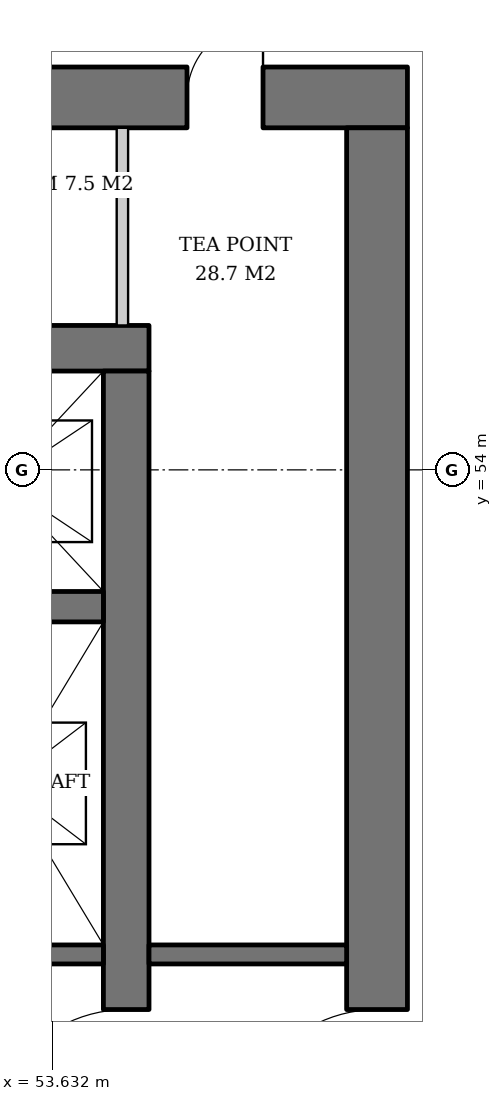
"""IFC4 building model, lengths in metres.
Left out: names, types, materials, properties, quantities, classifications, styles, units other than length and angle.
Written with IfcOpenShell. Run it as: python <this file> out.ifc"""

import sys

from ifc_helpers import new_model, si_unit, direction, frame, frame_2d, origin, place, context, subcontext, project, spatial, rectangle, extrude, element, fill, save


model = new_model("IFC4")
c1 = context("Model", 3, precision=1e-05, world=origin(), true_north=direction((0.0, 1.0)))
c2 = subcontext(c1, "Body", "Model", "MODEL_VIEW")
j1 = project(units=[si_unit("LENGTHUNIT", "METRE"), si_unit("PLANEANGLEUNIT", "RADIAN")], contexts=[c1])
p1 = place(None, origin())
s1 = spatial("IfcSite", under=j1, at=p1, CompositionType="ELEMENT")
p2 = place(p1, origin())
s2 = spatial("IfcBuilding", under=s1, at=p2, CompositionType="ELEMENT")
p3 = place(p2, frame((0.0, 0.0, 66.6)))
s3 = spatial("IfcBuildingStorey", under=s2, at=p3, CompositionType="ELEMENT", Elevation=66.6)
p4 = place(p3, frame((35.1, 55.6, 0.0), z_axis=(0.0, 0.0, 1.0), x_axis=(1.0, 0.0, 0.0)))
e1 = element("IfcWall", 1, at=p4, inside=s3, PredefinedType="SHEAR", context=c2, shape_type="SweptSolid", body=[
    extrude(rectangle(XDim=19.8, YDim=0.6, at=frame_2d((9.9, 0.0))), origin(), (0.0, 0.0, 1.0), 3.8),
])
p5 = place(p4, frame((14.54, 0.0, 0.0)))
e2 = element("IfcOpeningElement", 2, at=p5, cuts=e1, PredefinedType="OPENING", context=c2, shape_type="SweptSolid", body=[
    extrude(rectangle(XDim=1.0, YDim=2.1, at=frame_2d((0.5, 1.05))), frame((0.0, 0.31, 0.0), z_axis=(0.0, -1.0, 0.0), x_axis=(1.0, 0.0, 0.0)), (0.0, 0.0, 1.0), 0.62),
])
p6 = place(p4, frame((2.425, 0.0, 0.0)))
e3 = element("IfcOpeningElement", 3, at=p6, cuts=e1, PredefinedType="OPENING", context=c2, shape_type="SweptSolid", body=[
    extrude(rectangle(XDim=1.0, YDim=2.1, at=frame_2d((0.5, 1.05))), frame((0.0, 0.31, 0.0), z_axis=(0.0, -1.0, 0.0), x_axis=(1.0, 0.0, 0.0)), (0.0, 0.0, 1.0), 0.62),
])
p7 = place(p3, frame((54.6, 36.7, 0.0), z_axis=(0.0, 0.0, 1.0), x_axis=(0.0, 1.0, 0.0)))
e4 = element("IfcWall", 4, at=p7, inside=s3, PredefinedType="SHEAR", context=c2, shape_type="SweptSolid", body=[
    extrude(rectangle(XDim=18.6, YDim=0.6, at=frame_2d((9.3, 0.0))), origin(), (0.0, 0.0, 1.0), 3.8),
])
p8 = place(p7, frame((8.4, 0.0, 0.0)))
e5 = element("IfcOpeningElement", 5, at=p8, cuts=e4, PredefinedType="OPENING", context=c2, shape_type="SweptSolid", body=[
    extrude(rectangle(XDim=1.8, YDim=2.4, at=frame_2d((0.9, 1.2))), frame((0.0, 0.31, 0.0), z_axis=(0.0, -1.0, 0.0), x_axis=(1.0, 0.0, 0.0)), (0.0, 0.0, 1.0), 0.62),
])
p9 = place(p3, frame((31.7, 58.9, 0.0), z_axis=(0.0, 0.0, 1.0), x_axis=(1.0, 0.0, 0.0)))
e6 = element("IfcWall", 6, at=p9, inside=s3, PredefinedType="SHEAR", context=c2, shape_type="SweptSolid", body=[
    extrude(rectangle(XDim=26.6, YDim=0.8, at=frame_2d((13.3, 0.0))), origin(), (0.0, 0.0, 1.0), 3.8),
])
p10 = place(p9, frame((17.94, 0.0, 0.0)))
e7 = element("IfcOpeningElement", 7, at=p10, cuts=e6, PredefinedType="OPENING", context=c2, shape_type="SweptSolid", body=[
    extrude(rectangle(XDim=1.0, YDim=2.1, at=frame_2d((0.5, 1.05))), frame((0.0, 0.41, 0.0), z_axis=(0.0, -1.0, 0.0), x_axis=(1.0, 0.0, 0.0)), (0.0, 0.0, 1.0), 0.82),
])
p11 = place(p9, frame((5.825, 0.0, 0.0)))
e8 = element("IfcOpeningElement", 8, at=p11, cuts=e6, PredefinedType="OPENING", context=c2, shape_type="SweptSolid", body=[
    extrude(rectangle(XDim=1.0, YDim=2.1, at=frame_2d((0.5, 1.05))), frame((0.0, 0.41, 0.0), z_axis=(0.0, -1.0, 0.0), x_axis=(1.0, 0.0, 0.0)), (0.0, 0.0, 1.0), 0.82),
])
p12 = place(p9, frame((1.233, 0.0, 0.0)))
e9 = element("IfcOpeningElement", 9, at=p12, cuts=e6, PredefinedType="OPENING", context=c2, shape_type="SweptSolid", body=[
    extrude(rectangle(XDim=1.0, YDim=2.1, at=frame_2d((0.5, 1.05))), frame((0.0, 0.41, 0.0), z_axis=(0.0, -1.0, 0.0), x_axis=(1.0, 0.0, 0.0)), (0.0, 0.0, 1.0), 0.82),
])
p13 = place(p9, frame((3.479, 0.0, 0.0)))
e10 = element("IfcOpeningElement", 10, at=p13, cuts=e6, PredefinedType="OPENING", context=c2, shape_type="SweptSolid", body=[
    extrude(rectangle(XDim=1.0, YDim=2.1, at=frame_2d((0.5, 1.05))), frame((0.0, 0.41, 0.0), z_axis=(0.0, -1.0, 0.0), x_axis=(1.0, 0.0, 0.0)), (0.0, 0.0, 1.0), 0.82),
])
p14 = place(p9, frame((7.95, 0.0, 0.0)))
e11 = element("IfcOpeningElement", 11, at=p14, cuts=e6, PredefinedType="OPENING", context=c2, shape_type="SweptSolid", body=[
    extrude(rectangle(XDim=1.0, YDim=2.1, at=frame_2d((0.5, 1.05))), frame((0.0, 0.41, 0.0), z_axis=(0.0, -1.0, 0.0), x_axis=(1.0, 0.0, 0.0)), (0.0, 0.0, 1.0), 0.82),
])
p15 = place(p9, frame((11.038, 0.0, 0.0)))
e12 = element("IfcOpeningElement", 12, at=p15, cuts=e6, PredefinedType="OPENING", context=c2, shape_type="SweptSolid", body=[
    extrude(rectangle(XDim=1.0, YDim=2.1, at=frame_2d((0.5, 1.05))), frame((0.0, 0.41, 0.0), z_axis=(0.0, -1.0, 0.0), x_axis=(1.0, 0.0, 0.0)), (0.0, 0.0, 1.0), 0.82),
])
p16 = place(p9, frame((14.666, 0.0, 0.0)))
e13 = element("IfcOpeningElement", 13, at=p16, cuts=e6, PredefinedType="OPENING", context=c2, shape_type="SweptSolid", body=[
    extrude(rectangle(XDim=1.0, YDim=2.1, at=frame_2d((0.5, 1.05))), frame((0.0, 0.41, 0.0), z_axis=(0.0, -1.0, 0.0), x_axis=(1.0, 0.0, 0.0)), (0.0, 0.0, 1.0), 0.82),
])
p17 = place(p9, frame((20.875, 0.0, 0.0)))
e14 = element("IfcOpeningElement", 14, at=p17, cuts=e6, PredefinedType="OPENING", context=c2, shape_type="SweptSolid", body=[
    extrude(rectangle(XDim=1.0, YDim=2.1, at=frame_2d((0.5, 1.05))), frame((0.0, 0.41, 0.0), z_axis=(0.0, -1.0, 0.0), x_axis=(1.0, 0.0, 0.0)), (0.0, 0.0, 1.0), 0.82),
])
p18 = place(p9, frame((23.7, 0.0, 0.0)))
e15 = element("IfcOpeningElement", 15, at=p18, cuts=e6, PredefinedType="OPENING", context=c2, shape_type="SweptSolid", body=[
    extrude(rectangle(XDim=1.0, YDim=2.1, at=frame_2d((0.5, 1.05))), frame((0.0, 0.41, 0.0), z_axis=(0.0, -1.0, 0.0), x_axis=(1.0, 0.0, 0.0)), (0.0, 0.0, 1.0), 0.82),
])
p19 = place(p3, frame((57.9, 33.5, 0.0), z_axis=(0.0, 0.0, 1.0), x_axis=(0.0, 1.0, 0.0)))
e16 = element("IfcWall", 16, at=p19, inside=s3, PredefinedType="SHEAR", context=c2, shape_type="SweptSolid", body=[
    extrude(rectangle(XDim=25.0, YDim=0.8, at=frame_2d((12.5, 0.0))), origin(), (0.0, 0.0, 1.0), 3.8),
])
p20 = place(p19, frame((11.6, 0.0, 0.0)))
e17 = element("IfcOpeningElement", 17, at=p20, cuts=e16, PredefinedType="OPENING", context=c2, shape_type="SweptSolid", body=[
    extrude(rectangle(XDim=1.8, YDim=2.4, at=frame_2d((0.9, 1.2))), frame((0.0, 0.41, 0.0), z_axis=(0.0, -1.0, 0.0), x_axis=(1.0, 0.0, 0.0)), (0.0, 0.0, 1.0), 0.82),
])
p21 = place(p3, frame((35.7, 52.2, 0.0), z_axis=(0.0, 0.0, 1.0), x_axis=(1.0, 0.0, 0.0)))
e18 = element("IfcWall", 18, at=p21, inside=s3, PredefinedType="SHEAR", context=c2, shape_type="SweptSolid", body=[
    extrude(rectangle(XDim=18.6, YDim=0.4, at=frame_2d((9.3, 0.0))), origin(), (0.0, 0.0, 1.0), 3.8),
])
p22 = place(p3, frame((48.93, 47.625, 0.0), z_axis=(0.0, 0.0, 1.0), x_axis=(1.0, 0.0, 0.0)))
e19 = element("IfcWall", 19, at=p22, inside=s3, PredefinedType="SHEAR", context=c2, shape_type="SweptSolid", body=[
    extrude(rectangle(XDim=5.37, YDim=0.25, at=frame_2d((2.685, 0.0))), origin(), (0.0, 0.0, 1.0), 3.8),
])
p23 = place(p3, frame((54.9, 47.625, 0.0), z_axis=(0.0, 0.0, 1.0), x_axis=(1.0, 0.0, 0.0)))
e20 = element("IfcWall", 20, at=p23, inside=s3, PredefinedType="SOLIDWALL", context=c2, shape_type="SweptSolid", body=[
    extrude(rectangle(XDim=2.6, YDim=0.25, at=frame_2d((1.3, 0.0))), origin(), (0.0, 0.0, 1.0), 3.62),
])
p24 = place(p3, frame((54.55, 55.9, 0.0), z_axis=(0.0, 0.0, 1.0), x_axis=(0.0, 1.0, 0.0)))
e21 = element("IfcWall", 21, at=p24, inside=s3, PredefinedType="SOLIDWALL", context=c2, shape_type="SweptSolid", body=[
    extrude(rectangle(XDim=2.6, YDim=0.15, at=frame_2d((1.3, 0.0))), origin(), (0.0, 0.0, 1.0), 3.62),
])
p25 = place(p8, origin())
e22 = element("IfcDoor", 22, at=p25, inside=s3, OperationType="DOUBLE_DOOR_SINGLE_SWING", PredefinedType="DOOR", context=c2, shape_type="SweptSolid", body=[
    extrude(rectangle(XDim=1.8, YDim=2.4, at=frame_2d((0.9, 1.2))), frame((0.0, 0.025, 0.0), z_axis=(0.0, -1.0, 0.0), x_axis=(1.0, 0.0, 0.0)), (0.0, 0.0, 1.0), 0.05),
])
fill(e5, e22)
p26 = place(p20, origin())
e23 = element("IfcDoor", 23, at=p26, inside=s3, OperationType="DOUBLE_DOOR_SINGLE_SWING", PredefinedType="DOOR", context=c2, shape_type="SweptSolid", body=[
    extrude(rectangle(XDim=1.8, YDim=2.4, at=frame_2d((0.9, 1.2))), frame((0.0, 0.025, 0.0), z_axis=(0.0, -1.0, 0.0), x_axis=(1.0, 0.0, 0.0)), (0.0, 0.0, 1.0), 0.05),
])
fill(e17, e23)
p27 = place(p18, origin())
e24 = element("IfcDoor", 24, at=p27, inside=s3, OperationType="SINGLE_SWING_RIGHT", PredefinedType="DOOR", context=c2, shape_type="SweptSolid", body=[
    extrude(rectangle(XDim=1.0, YDim=2.1, at=frame_2d((0.5, 1.05))), frame((0.0, -0.34, 0.0), z_axis=(0.0, -1.0, 0.0), x_axis=(1.0, 0.0, 0.0)), (0.0, 0.0, 1.0), 0.05),
])
fill(e15, e24)
save(model, sys.argv[1])
